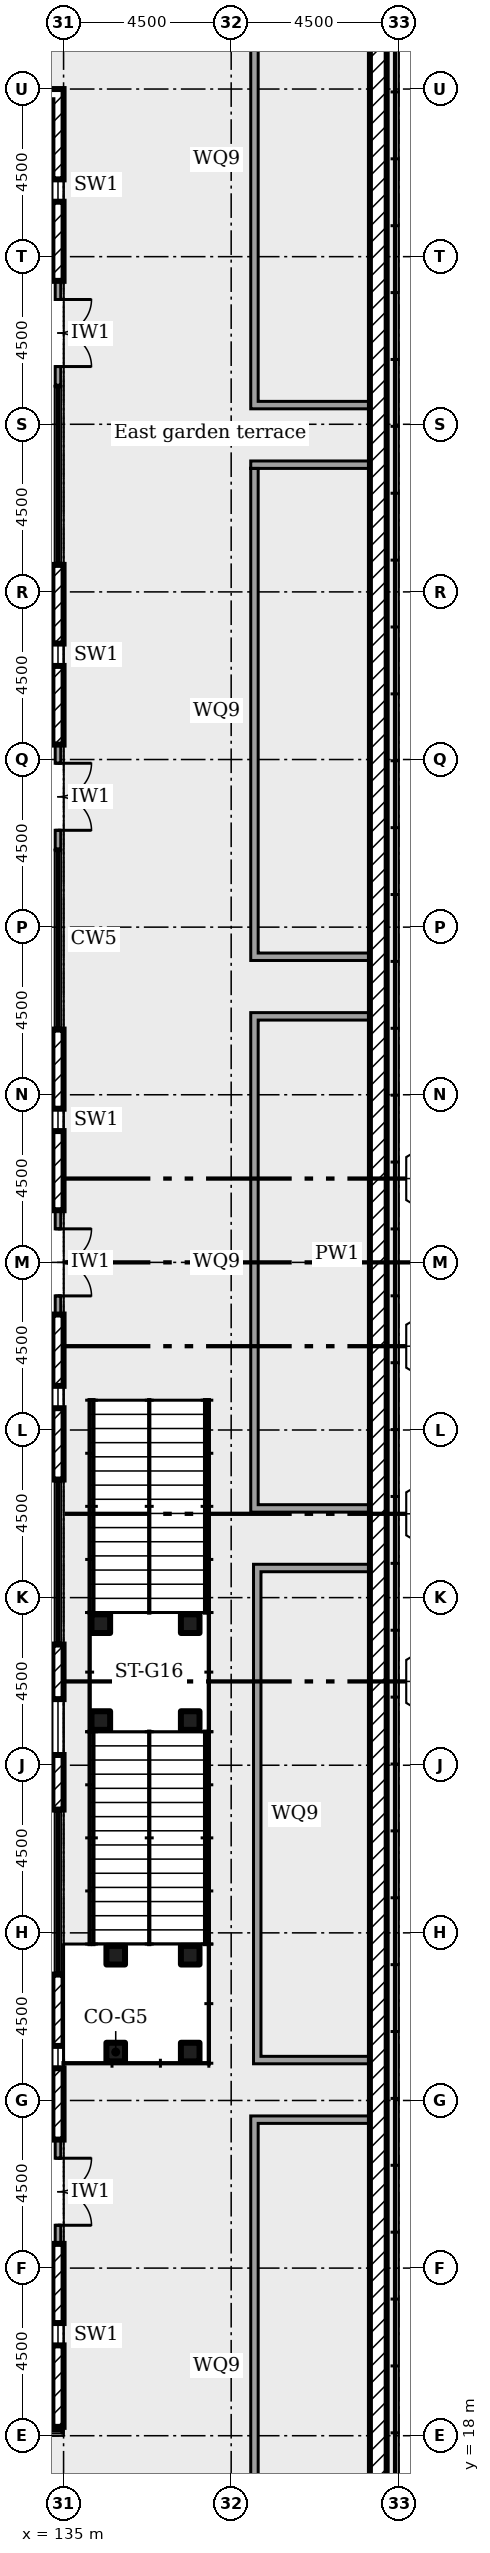
"""IFC4 building model, lengths in metres.
Left out: names, types, materials, properties, quantities, classifications, styles, units other than length and angle.
Written with IfcOpenShell. Run it as: python <this file> out.ifc"""

import sys

from ifc_helpers import new_model, si_unit, direction, frame, frame_2d, origin, origin_2d, place, context, subcontext, project, spatial, rectangle, extrude, element, fill, save


model = new_model("IFC4")
c1 = context("Model", 3, precision=1e-05, world=origin(), true_north=direction((0.0, 1.0)))
c2 = subcontext(c1, "Body", "Model", "MODEL_VIEW")
j1 = project(units=[si_unit("LENGTHUNIT", "METRE"), si_unit("PLANEANGLEUNIT", "RADIAN")], contexts=[c1])
p1 = place(None, origin())
s1 = spatial("IfcSite", under=j1, at=p1, CompositionType="ELEMENT")
p2 = place(p1, origin())
s2 = spatial("IfcBuilding", under=s1, at=p2, CompositionType="ELEMENT")
p3 = place(p2, frame((0.0, 0.0, 11.5)))
s3 = spatial("IfcBuildingStorey", under=s2, at=p3, CompositionType="ELEMENT", Elevation=11.5)
p4 = place(p3, frame((134.85, 18.238, 0.0), z_axis=(0.0, 0.0, 1.0), x_axis=(0.0, 1.0, 0.0)))
e1 = element("IfcWall", 1, at=p4, inside=s3, PredefinedType="ELEMENTEDWALL", context=c2, shape_type="SweptSolid", body=[
    extrude(rectangle(XDim=4.912, YDim=0.3, at=frame_2d((2.456, 0.0))), origin(), (0.0, 0.0, 1.0), 4.55),
])
p5 = place(p4, frame((2.188, 0.0, 0.45)))
e2 = element("IfcOpeningElement", 2, at=p5, cuts=e1, PredefinedType="OPENING", context=c2, shape_type="SweptSolid", body=[
    extrude(rectangle(XDim=0.6, YDim=2.4, at=frame_2d((0.3, 1.2))), frame((0.0, 0.16, 0.0), z_axis=(0.0, -1.0, 0.0), x_axis=(1.0, 0.0, 0.0)), (0.0, 0.0, 1.0), 0.32),
])
p6 = place(p3, frame((134.85, 23.15, 0.0), z_axis=(0.0, 0.0, 1.0), x_axis=(0.0, 1.0, 0.0)))
e3 = element("IfcWall", 3, at=p6, inside=s3, PredefinedType="SOLIDWALL", context=c2, shape_type="SweptSolid", body=[
    extrude(rectangle(XDim=2.8, YDim=0.15, at=frame_2d((1.4, 0.0))), origin(), (0.0, 0.0, 1.0), 4.55),
])
p7 = place(p6, frame((0.5, 0.0, 0.0)))
e4 = element("IfcOpeningElement", 4, at=p7, cuts=e3, PredefinedType="OPENING", context=c2, shape_type="SweptSolid", body=[
    extrude(rectangle(XDim=1.8, YDim=2.4, at=frame_2d((0.9, 1.2))), frame((0.0, 0.085, 0.0), z_axis=(0.0, -1.0, 0.0), x_axis=(1.0, 0.0, 0.0)), (0.0, 0.0, 1.0), 0.17),
])
p8 = place(p3, frame((134.85, 25.95, 0.0), z_axis=(0.0, 0.0, 1.0), x_axis=(0.0, 1.0, 0.0)))
e5 = element("IfcWall", 5, at=p8, inside=s3, PredefinedType="ELEMENTEDWALL", context=c2, shape_type="SweptSolid", body=[
    extrude(rectangle(XDim=4.43, YDim=0.3, at=frame_2d((2.215, 0.0))), origin(), (0.0, 0.0, 1.0), 4.55),
])
p9 = place(p8, frame((1.915, 0.0, 0.45)))
e6 = element("IfcOpeningElement", 6, at=p9, cuts=e5, PredefinedType="OPENING", context=c2, shape_type="SweptSolid", body=[
    extrude(rectangle(XDim=0.6, YDim=2.4, at=frame_2d((0.3, 1.2))), frame((0.0, 0.16, 0.0), z_axis=(0.0, -1.0, 0.0), x_axis=(1.0, 0.0, 0.0)), (0.0, 0.0, 1.0), 0.32),
])
p10 = place(p3, frame((134.85, 34.81, 0.0), z_axis=(0.0, 0.0, 1.0), x_axis=(0.0, 1.0, 0.0)))
e7 = element("IfcWall", 7, at=p10, inside=s3, PredefinedType="ELEMENTEDWALL", context=c2, shape_type="SweptSolid", body=[
    extrude(rectangle(XDim=4.43, YDim=0.3, at=frame_2d((2.215, 0.0))), origin(), (0.0, 0.0, 1.0), 4.55),
])
p11 = place(p10, frame((1.465, 0.0, 0.9)))
e8 = element("IfcOpeningElement", 8, at=p11, cuts=e7, PredefinedType="OPENING", context=c2, shape_type="SweptSolid", body=[
    extrude(rectangle(XDim=1.5, YDim=1.8, at=frame_2d((0.75, 0.9))), frame((0.0, 0.16, 0.0), z_axis=(0.0, -1.0, 0.0), x_axis=(1.0, 0.0, 0.0)), (0.0, 0.0, 1.0), 0.32),
])
p12 = place(p3, frame((134.85, 43.67, 0.0), z_axis=(0.0, 0.0, 1.0), x_axis=(0.0, 1.0, 0.0)))
e9 = element("IfcWall", 9, at=p12, inside=s3, PredefinedType="ELEMENTEDWALL", context=c2, shape_type="SweptSolid", body=[
    extrude(rectangle(XDim=4.43, YDim=0.3, at=frame_2d((2.215, 0.0))), origin(), (0.0, 0.0, 1.0), 4.55),
])
p13 = place(p12, frame((1.915, 0.0, 0.45)))
e10 = element("IfcOpeningElement", 10, at=p13, cuts=e9, PredefinedType="OPENING", context=c2, shape_type="SweptSolid", body=[
    extrude(rectangle(XDim=0.6, YDim=2.4, at=frame_2d((0.3, 1.2))), frame((0.0, 0.16, 0.0), z_axis=(0.0, -1.0, 0.0), x_axis=(1.0, 0.0, 0.0)), (0.0, 0.0, 1.0), 0.32),
])
p14 = place(p3, frame((134.85, 48.1, 0.0), z_axis=(0.0, 0.0, 1.0), x_axis=(0.0, 1.0, 0.0)))
e11 = element("IfcWall", 11, at=p14, inside=s3, PredefinedType="SOLIDWALL", context=c2, shape_type="SweptSolid", body=[
    extrude(rectangle(XDim=2.8, YDim=0.15, at=frame_2d((1.4, 0.0))), origin(), (0.0, 0.0, 1.0), 4.55),
])
p15 = place(p14, frame((0.5, 0.0, 0.0)))
e12 = element("IfcOpeningElement", 12, at=p15, cuts=e11, PredefinedType="OPENING", context=c2, shape_type="SweptSolid", body=[
    extrude(rectangle(XDim=1.8, YDim=2.4, at=frame_2d((0.9, 1.2))), frame((0.0, 0.085, 0.0), z_axis=(0.0, -1.0, 0.0), x_axis=(1.0, 0.0, 0.0)), (0.0, 0.0, 1.0), 0.17),
])
p16 = place(p3, frame((134.85, 50.9, 0.0), z_axis=(0.0, 0.0, 1.0), x_axis=(0.0, 1.0, 0.0)))
e13 = element("IfcWall", 13, at=p16, inside=s3, PredefinedType="ELEMENTEDWALL", context=c2, shape_type="SweptSolid", body=[
    extrude(rectangle(XDim=4.85, YDim=0.3, at=frame_2d((2.425, 0.0))), origin(), (0.0, 0.0, 1.0), 4.55),
])
p17 = place(p16, frame((2.125, 0.0, 0.45)))
e14 = element("IfcOpeningElement", 14, at=p17, cuts=e13, PredefinedType="OPENING", context=c2, shape_type="SweptSolid", body=[
    extrude(rectangle(XDim=0.6, YDim=2.4, at=frame_2d((0.3, 1.2))), frame((0.0, 0.16, 0.0), z_axis=(0.0, -1.0, 0.0), x_axis=(1.0, 0.0, 0.0)), (0.0, 0.0, 1.0), 0.32),
])
p18 = place(p3, frame((134.85, 60.6, 0.0), z_axis=(0.0, 0.0, 1.0), x_axis=(0.0, 1.0, 0.0)))
e15 = element("IfcWall", 15, at=p18, inside=s3, PredefinedType="SOLIDWALL", context=c2, shape_type="SweptSolid", body=[
    extrude(rectangle(XDim=2.8, YDim=0.15, at=frame_2d((1.4, 0.0))), origin(), (0.0, 0.0, 1.0), 4.55),
])
p19 = place(p18, frame((0.5, 0.0, 0.0)))
e16 = element("IfcOpeningElement", 16, at=p19, cuts=e15, PredefinedType="OPENING", context=c2, shape_type="SweptSolid", body=[
    extrude(rectangle(XDim=1.8, YDim=2.4, at=frame_2d((0.9, 1.2))), frame((0.0, 0.085, 0.0), z_axis=(0.0, -1.0, 0.0), x_axis=(1.0, 0.0, 0.0)), (0.0, 0.0, 1.0), 0.17),
])
p20 = place(p3, frame((134.85, 63.4, 0.0), z_axis=(0.0, 0.0, 1.0), x_axis=(0.0, 1.0, 0.0)))
e17 = element("IfcWall", 17, at=p20, inside=s3, PredefinedType="ELEMENTEDWALL", context=c2, shape_type="SweptSolid", body=[
    extrude(rectangle(XDim=4.825, YDim=0.3, at=frame_2d((2.413, 0.0))), origin(), (0.0, 0.0, 1.0), 4.55),
])
p21 = place(p20, frame((2.113, 0.0, 0.45)))
e18 = element("IfcOpeningElement", 18, at=p21, cuts=e17, PredefinedType="OPENING", context=c2, shape_type="SweptSolid", body=[
    extrude(rectangle(XDim=0.6, YDim=2.4, at=frame_2d((0.3, 1.2))), frame((0.0, 0.16, 0.0), z_axis=(0.0, -1.0, 0.0), x_axis=(1.0, 0.0, 0.0)), (0.0, 0.0, 1.0), 0.32),
])
p22 = place(p3, frame((134.85, 73.05, 0.0), z_axis=(0.0, 0.0, 1.0), x_axis=(0.0, 1.0, 0.0)))
e19 = element("IfcWall", 19, at=p22, inside=s3, PredefinedType="SOLIDWALL", context=c2, shape_type="SweptSolid", body=[
    extrude(rectangle(XDim=2.8, YDim=0.15, at=frame_2d((1.4, 0.0))), origin(), (0.0, 0.0, 1.0), 4.55),
])
p23 = place(p22, frame((0.5, 0.0, 0.0)))
e20 = element("IfcOpeningElement", 20, at=p23, cuts=e19, PredefinedType="OPENING", context=c2, shape_type="SweptSolid", body=[
    extrude(rectangle(XDim=1.8, YDim=2.4, at=frame_2d((0.9, 1.2))), frame((0.0, 0.085, 0.0), z_axis=(0.0, -1.0, 0.0), x_axis=(1.0, 0.0, 0.0)), (0.0, 0.0, 1.0), 0.17),
])
p24 = place(p3, frame((134.85, 75.85, 0.0), z_axis=(0.0, 0.0, 1.0), x_axis=(0.0, 1.0, 0.0)))
e21 = element("IfcWall", 21, at=p24, inside=s3, PredefinedType="ELEMENTEDWALL", context=c2, shape_type="SweptSolid", body=[
    extrude(rectangle(XDim=5.15, YDim=0.3, at=frame_2d((2.575, 0.0))), origin(), (0.0, 0.0, 1.0), 4.55),
])
p25 = place(p24, frame((2.125, 0.0, 0.45)))
e22 = element("IfcOpeningElement", 22, at=p25, cuts=e21, PredefinedType="OPENING", context=c2, shape_type="SweptSolid", body=[
    extrude(rectangle(XDim=0.6, YDim=2.4, at=frame_2d((0.3, 1.2))), frame((0.0, 0.16, 0.0), z_axis=(0.0, -1.0, 0.0), x_axis=(1.0, 0.0, 0.0)), (0.0, 0.0, 1.0), 0.32),
])
p26 = place(p3, frame((143.45, 9.775, 0.0), z_axis=(0.0, 0.0, 1.0), x_axis=(0.0, 1.0, 0.0)))
e23 = element("IfcWall", 23, at=p26, inside=s3, PredefinedType="SOLIDWALL", context=c2, shape_type="SweptSolid", body=[
    extrude(rectangle(XDim=79.9, YDim=0.45, at=frame_2d((39.95, 0.0))), origin(), (0.0, 0.0, 1.0), 0.6),
])
p27 = place(p3, frame((140.025, 26.485, 0.0)))
e24 = element("IfcWall", 24, at=p27, inside=s3, PredefinedType="SOLIDWALL", context=c2, shape_type="SweptSolid", body=[
    extrude(rectangle(XDim=3.2, YDim=0.2, at=frame_2d((1.6, 0.0))), origin(), (0.0, 0.0, 1.0), 0.45),
])
p28 = place(p3, frame((140.125, 13.375, 0.0), z_axis=(0.0, 0.0, 1.0), x_axis=(0.0, 1.0, 0.0)))
e25 = element("IfcWall", 25, at=p28, inside=s3, PredefinedType="SOLIDWALL", context=c2, shape_type="SweptSolid", body=[
    extrude(rectangle(XDim=13.01, YDim=0.2, at=frame_2d((6.505, 0.0))), origin(), (0.0, 0.0, 1.0), 0.45),
])
for number, where in (
    (26, (140.1, 41.295, 0.0)),
    (27, (140.1, 28.085, 0.0)),
):
    element("IfcWall", number, at=place(p3, frame(where)), inside=s3, PredefinedType="SOLIDWALL", context=c2, shape_type="SweptSolid", body=[
        extrude(rectangle(XDim=3.125, YDim=0.2, at=frame_2d((1.562, 0.0))), origin(), (0.0, 0.0, 1.0), 0.45),
    ])
p29 = place(p3, frame((140.2, 28.185, 0.0), z_axis=(0.0, 0.0, 1.0), x_axis=(0.0, 1.0, 0.0)))
e28 = element("IfcWall", 28, at=p29, inside=s3, PredefinedType="SOLIDWALL", context=c2, shape_type="SweptSolid", body=[
    extrude(rectangle(XDim=13.01, YDim=0.2, at=frame_2d((6.505, 0.0))), origin(), (0.0, 0.0, 1.0), 0.45),
])
for number, where in (
    (29, (140.025, 56.105, 0.0)),
    (30, (140.025, 42.895, 0.0)),
):
    element("IfcWall", number, at=place(p3, frame(where)), inside=s3, PredefinedType="SOLIDWALL", context=c2, shape_type="SweptSolid", body=[
        extrude(rectangle(XDim=3.2, YDim=0.2, at=frame_2d((1.6, 0.0))), origin(), (0.0, 0.0, 1.0), 0.45),
    ])
p30 = place(p3, frame((140.125, 42.995, 0.0), z_axis=(0.0, 0.0, 1.0), x_axis=(0.0, 1.0, 0.0)))
e31 = element("IfcWall", 31, at=p30, inside=s3, PredefinedType="SOLIDWALL", context=c2, shape_type="SweptSolid", body=[
    extrude(rectangle(XDim=13.01, YDim=0.2, at=frame_2d((6.505, 0.0))), origin(), (0.0, 0.0, 1.0), 0.45),
])
for number, where in (
    (32, (140.025, 70.915, 0.0)),
    (33, (140.025, 57.705, 0.0)),
):
    element("IfcWall", number, at=place(p3, frame(where)), inside=s3, PredefinedType="SOLIDWALL", context=c2, shape_type="SweptSolid", body=[
        extrude(rectangle(XDim=3.2, YDim=0.2, at=frame_2d((1.6, 0.0))), origin(), (0.0, 0.0, 1.0), 0.45),
    ])
p31 = place(p3, frame((140.125, 57.805, 0.0), z_axis=(0.0, 0.0, 1.0), x_axis=(0.0, 1.0, 0.0)))
e34 = element("IfcWall", 34, at=p31, inside=s3, PredefinedType="SOLIDWALL", context=c2, shape_type="SweptSolid", body=[
    extrude(rectangle(XDim=13.01, YDim=0.2, at=frame_2d((6.505, 0.0))), origin(), (0.0, 0.0, 1.0), 0.45),
])
p32 = place(p3, frame((140.025, 72.515, 0.0)))
e35 = element("IfcWall", 35, at=p32, inside=s3, PredefinedType="SOLIDWALL", context=c2, shape_type="SweptSolid", body=[
    extrude(rectangle(XDim=3.2, YDim=0.2, at=frame_2d((1.6, 0.0))), origin(), (0.0, 0.0, 1.0), 0.45),
])
p33 = place(p3, frame((140.125, 72.615, 0.0), z_axis=(0.0, 0.0, 1.0), x_axis=(0.0, 1.0, 0.0)))
e36 = element("IfcWall", 36, at=p33, inside=s3, PredefinedType="SOLIDWALL", context=c2, shape_type="SweptSolid", body=[
    extrude(rectangle(XDim=13.01, YDim=0.2, at=frame_2d((6.505, 0.0))), origin(), (0.0, 0.0, 1.0), 0.45),
])
for number, where in (
    (37, (136.4, 28.3, 0.0)),
    (38, (138.4, 28.3, 0.0)),
    (39, (136.4, 30.9, 0.0)),
    (40, (138.4, 30.9, 0.0)),
):
    element("IfcColumn", number, at=place(p3, frame(where)), inside=s3, PredefinedType="COLUMN", context=c2, shape_type="SweptSolid", body=[
        extrude(rectangle(XDim=0.5, YDim=0.5, at=origin_2d()), origin(), (0.0, 0.0, 1.0), 4.75),
    ])
for number, where in (
    (41, (136.0, 37.2, 0.0)),
    (42, (138.4, 37.2, 0.0)),
    (43, (136.0, 39.8, 0.0)),
    (44, (138.4, 39.8, 0.0)),
):
    element("IfcColumn", number, at=place(p3, frame(where)), inside=s3, PredefinedType="COLUMN", context=c2, shape_type="SweptSolid", body=[
        extrude(rectangle(XDim=0.5, YDim=0.5, at=origin_2d()), origin(), (0.0, 0.0, 1.0), 2.25),
    ])
p34 = place(p5, origin())
e45 = element("IfcWindow", 45, at=p34, inside=s3, PartitioningType="SINGLE_PANEL", PredefinedType="WINDOW", context=c2, shape_type="SweptSolid", body=[
    extrude(rectangle(XDim=0.6, YDim=2.4, at=frame_2d((0.3, 1.2))), frame((0.0, 0.03, 0.0), z_axis=(0.0, -1.0, 0.0), x_axis=(1.0, 0.0, 0.0)), (0.0, 0.0, 1.0), 0.06),
])
fill(e2, e45)
p35 = place(p7, frame((1.8, 0.0, 0.0), x_axis=(-1.0, 0.0, 0.0)))
e46 = element("IfcDoor", 46, at=p35, inside=s3, OperationType="DOUBLE_DOOR_DOUBLE_SWING", PredefinedType="NOTDEFINED", context=c2, shape_type="SweptSolid", body=[
    extrude(rectangle(XDim=1.8, YDim=2.4, at=frame_2d((0.9, 1.2))), frame((0.0, 0.025, 0.0), z_axis=(0.0, -1.0, 0.0), x_axis=(1.0, 0.0, 0.0)), (0.0, 0.0, 1.0), 0.05),
])
fill(e4, e46)
p36 = place(p9, origin())
e47 = element("IfcWindow", 47, at=p36, inside=s3, PartitioningType="SINGLE_PANEL", PredefinedType="WINDOW", context=c2, shape_type="SweptSolid", body=[
    extrude(rectangle(XDim=0.6, YDim=2.4, at=frame_2d((0.3, 1.2))), frame((0.0, 0.03, 0.0), z_axis=(0.0, -1.0, 0.0), x_axis=(1.0, 0.0, 0.0)), (0.0, 0.0, 1.0), 0.06),
])
fill(e6, e47)
p37 = place(p11, origin())
e48 = element("IfcWindow", 48, at=p37, inside=s3, PartitioningType="SINGLE_PANEL", PredefinedType="WINDOW", context=c2, shape_type="SweptSolid", body=[
    extrude(rectangle(XDim=1.5, YDim=1.8, at=frame_2d((0.75, 0.9))), frame((0.0, 0.03, 0.0), z_axis=(0.0, -1.0, 0.0), x_axis=(1.0, 0.0, 0.0)), (0.0, 0.0, 1.0), 0.06),
])
fill(e8, e48)
p38 = place(p13, origin())
e49 = element("IfcWindow", 49, at=p38, inside=s3, PartitioningType="SINGLE_PANEL", PredefinedType="WINDOW", context=c2, shape_type="SweptSolid", body=[
    extrude(rectangle(XDim=0.6, YDim=2.4, at=frame_2d((0.3, 1.2))), frame((0.0, 0.03, 0.0), z_axis=(0.0, -1.0, 0.0), x_axis=(1.0, 0.0, 0.0)), (0.0, 0.0, 1.0), 0.06),
])
fill(e10, e49)
p39 = place(p15, frame((1.8, 0.0, 0.0), x_axis=(-1.0, 0.0, 0.0)))
e50 = element("IfcDoor", 50, at=p39, inside=s3, OperationType="DOUBLE_DOOR_DOUBLE_SWING", PredefinedType="NOTDEFINED", context=c2, shape_type="SweptSolid", body=[
    extrude(rectangle(XDim=1.8, YDim=2.4, at=frame_2d((0.9, 1.2))), frame((0.0, 0.025, 0.0), z_axis=(0.0, -1.0, 0.0), x_axis=(1.0, 0.0, 0.0)), (0.0, 0.0, 1.0), 0.05),
])
fill(e12, e50)
p40 = place(p17, origin())
e51 = element("IfcWindow", 51, at=p40, inside=s3, PartitioningType="SINGLE_PANEL", PredefinedType="WINDOW", context=c2, shape_type="SweptSolid", body=[
    extrude(rectangle(XDim=0.6, YDim=2.4, at=frame_2d((0.3, 1.2))), frame((0.0, 0.03, 0.0), z_axis=(0.0, -1.0, 0.0), x_axis=(1.0, 0.0, 0.0)), (0.0, 0.0, 1.0), 0.06),
])
fill(e14, e51)
p41 = place(p19, frame((1.8, 0.0, 0.0), x_axis=(-1.0, 0.0, 0.0)))
e52 = element("IfcDoor", 52, at=p41, inside=s3, OperationType="DOUBLE_DOOR_DOUBLE_SWING", PredefinedType="NOTDEFINED", context=c2, shape_type="SweptSolid", body=[
    extrude(rectangle(XDim=1.8, YDim=2.4, at=frame_2d((0.9, 1.2))), frame((0.0, 0.025, 0.0), z_axis=(0.0, -1.0, 0.0), x_axis=(1.0, 0.0, 0.0)), (0.0, 0.0, 1.0), 0.05),
])
fill(e16, e52)
p42 = place(p21, origin())
e53 = element("IfcWindow", 53, at=p42, inside=s3, PartitioningType="SINGLE_PANEL", PredefinedType="WINDOW", context=c2, shape_type="SweptSolid", body=[
    extrude(rectangle(XDim=0.6, YDim=2.4, at=frame_2d((0.3, 1.2))), frame((0.0, 0.03, 0.0), z_axis=(0.0, -1.0, 0.0), x_axis=(1.0, 0.0, 0.0)), (0.0, 0.0, 1.0), 0.06),
])
fill(e18, e53)
p43 = place(p23, frame((1.8, 0.0, 0.0), x_axis=(-1.0, 0.0, 0.0)))
e54 = element("IfcDoor", 54, at=p43, inside=s3, OperationType="DOUBLE_DOOR_DOUBLE_SWING", PredefinedType="NOTDEFINED", context=c2, shape_type="SweptSolid", body=[
    extrude(rectangle(XDim=1.8, YDim=2.4, at=frame_2d((0.9, 1.2))), frame((0.0, 0.025, 0.0), z_axis=(0.0, -1.0, 0.0), x_axis=(1.0, 0.0, 0.0)), (0.0, 0.0, 1.0), 0.05),
])
fill(e20, e54)
p44 = place(p25, origin())
e55 = element("IfcWindow", 55, at=p44, inside=s3, PartitioningType="SINGLE_PANEL", PredefinedType="WINDOW", context=c2, shape_type="SweptSolid", body=[
    extrude(rectangle(XDim=0.6, YDim=2.4, at=frame_2d((0.3, 1.2))), frame((0.0, 0.03, 0.0), z_axis=(0.0, -1.0, 0.0), x_axis=(1.0, 0.0, 0.0)), (0.0, 0.0, 1.0), 0.06),
])
fill(e22, e55)
save(model, sys.argv[1])
